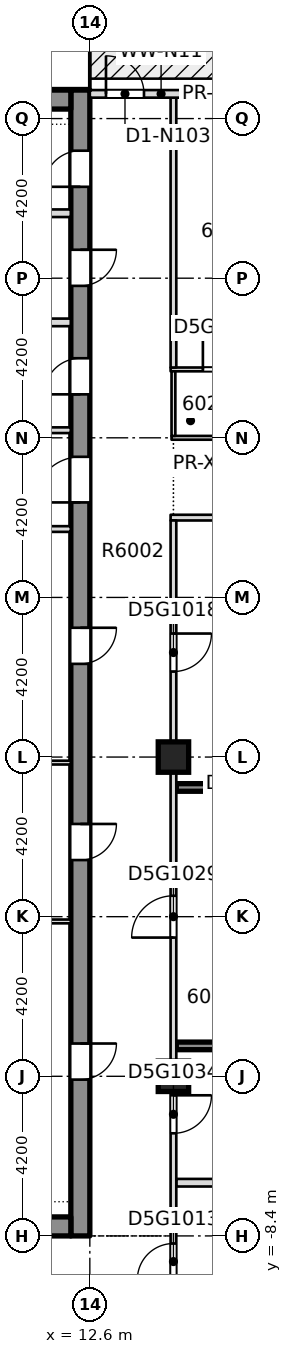
"""IFC4 building model, lengths in metres.
Left out: names, types, materials, properties, quantities, classifications, styles, units other than length and angle.
Written with IfcOpenShell. Run it as: python <this file> out.ifc"""

import sys

from ifc_helpers import new_model, si_unit, direction, frame, frame_2d, origin, origin_2d, place, context, subcontext, project, spatial, rectangle, extrude, element, fill, save


model = new_model("IFC4")
c1 = context("Model", 3, precision=1e-05, world=origin(), true_north=direction((0.0, 1.0)))
c2 = subcontext(c1, "Body", "Model", "MODEL_VIEW")
j1 = project(units=[si_unit("LENGTHUNIT", "METRE"), si_unit("PLANEANGLEUNIT", "RADIAN")], contexts=[c1])
p1 = place(None, origin())
s1 = spatial("IfcSite", under=j1, at=p1, CompositionType="ELEMENT")
p2 = place(p1, origin())
s2 = spatial("IfcBuilding", under=s1, at=p2, CompositionType="ELEMENT")
p3 = place(p2, frame((0.0, 0.0, 230.35)))
s3 = spatial("IfcBuildingStorey", under=s2, at=p3, CompositionType="ELEMENT", Elevation=230.35)
p4 = place(p3, frame((12.35, -8.4, -0.4), z_axis=(0.0, 0.0, 1.0), x_axis=(0.0, 1.0, 0.0)))
e1 = element("IfcWall", 1, at=p4, inside=s3, PredefinedType="SHEAR", context=c2, shape_type="SweptSolid", body=[
    extrude(rectangle(XDim=30.15, YDim=0.5, at=frame_2d((15.075, 0.0))), origin(), (0.0, 0.0, 1.0), 3.45),
])
p5 = place(p4, frame((4.113, 0.0, 0.4)))
e2 = element("IfcOpeningElement", 2, at=p5, cuts=e1, PredefinedType="OPENING", context=c2, shape_type="SweptSolid", body=[
    extrude(rectangle(XDim=0.95, YDim=2.1, at=frame_2d((0.475, 1.05))), frame((0.0, 0.26, 0.0), z_axis=(0.0, -1.0, 0.0), x_axis=(1.0, 0.0, 0.0)), (0.0, 0.0, 1.0), 0.52),
])
p6 = place(p4, frame((9.89, 0.0, 0.4)))
e3 = element("IfcOpeningElement", 3, at=p6, cuts=e1, PredefinedType="OPENING", context=c2, shape_type="SweptSolid", body=[
    extrude(rectangle(XDim=0.95, YDim=2.1, at=frame_2d((0.475, 1.05))), frame((0.0, 0.26, 0.0), z_axis=(0.0, -1.0, 0.0), x_axis=(1.0, 0.0, 0.0)), (0.0, 0.0, 1.0), 0.52),
])
p7 = place(p4, frame((15.052, 0.0, 0.4)))
e4 = element("IfcOpeningElement", 4, at=p7, cuts=e1, PredefinedType="OPENING", context=c2, shape_type="SweptSolid", body=[
    extrude(rectangle(XDim=0.95, YDim=2.1, at=frame_2d((0.475, 1.05))), frame((0.0, 0.26, 0.0), z_axis=(0.0, -1.0, 0.0), x_axis=(1.0, 0.0, 0.0)), (0.0, 0.0, 1.0), 0.52),
])
p8 = place(p4, frame((22.144, 0.0, 0.4)))
e5 = element("IfcOpeningElement", 5, at=p8, cuts=e1, PredefinedType="OPENING", context=c2, shape_type="SweptSolid", body=[
    extrude(rectangle(XDim=0.95, YDim=2.1, at=frame_2d((0.475, 1.05))), frame((0.0, 0.26, 0.0), z_axis=(0.0, -1.0, 0.0), x_axis=(1.0, 0.0, 0.0)), (0.0, 0.0, 1.0), 0.52),
])
p9 = place(p4, frame((24.998, 0.0, 0.4)))
e6 = element("IfcOpeningElement", 6, at=p9, cuts=e1, PredefinedType="OPENING", context=c2, shape_type="SweptSolid", body=[
    extrude(rectangle(XDim=0.95, YDim=2.1, at=frame_2d((0.475, 1.05))), frame((0.0, 0.26, 0.0), z_axis=(0.0, -1.0, 0.0), x_axis=(1.0, 0.0, 0.0)), (0.0, 0.0, 1.0), 0.52),
])
p10 = place(p4, frame((27.605, 0.0, 0.4)))
e7 = element("IfcOpeningElement", 7, at=p10, cuts=e1, PredefinedType="OPENING", context=c2, shape_type="SweptSolid", body=[
    extrude(rectangle(XDim=0.95, YDim=2.1, at=frame_2d((0.475, 1.05))), frame((0.0, 0.26, 0.0), z_axis=(0.0, -1.0, 0.0), x_axis=(1.0, 0.0, 0.0)), (0.0, 0.0, 1.0), 0.52),
])
p11 = place(p4, frame((19.3, 0.0, 0.4)))
e8 = element("IfcOpeningElement", 8, at=p11, cuts=e1, PredefinedType="OPENING", context=c2, shape_type="SweptSolid", body=[
    extrude(rectangle(XDim=1.2, YDim=2.1, at=frame_2d((0.6, 1.05))), frame((0.0, 0.26, 0.0), z_axis=(0.0, -1.0, 0.0), x_axis=(1.0, 0.0, 0.0)), (0.0, 0.0, 1.0), 0.52),
])
p12 = place(p3, frame((-12.1, -8.15, -0.4), z_axis=(0.0, 0.0, 1.0), x_axis=(1.0, 0.0, 0.0)))
e9 = element("IfcWall", 9, at=p12, inside=s3, PredefinedType="SHEAR", context=c2, shape_type="SweptSolid", body=[
    extrude(rectangle(XDim=24.2, YDim=0.5, at=frame_2d((12.1, 0.0))), origin(), (0.0, 0.0, 1.0), 3.45),
])
p13 = place(p12, frame((7.35, 0.0, 0.4)))
e10 = element("IfcOpeningElement", 10, at=p13, cuts=e9, PredefinedType="OPENING", context=c2, shape_type="SweptSolid", body=[
    extrude(rectangle(XDim=1.8, YDim=2.1, at=frame_2d((0.9, 1.05))), frame((0.0, 0.26, 0.0), z_axis=(0.0, -1.0, 0.0), x_axis=(1.0, 0.0, 0.0)), (0.0, 0.0, 1.0), 0.52),
])
p14 = place(p12, frame((15.05, 0.0, 0.4)))
e11 = element("IfcOpeningElement", 11, at=p14, cuts=e9, PredefinedType="OPENING", context=c2, shape_type="SweptSolid", body=[
    extrude(rectangle(XDim=1.8, YDim=2.1, at=frame_2d((0.9, 1.05))), frame((0.0, 0.26, 0.0), z_axis=(0.0, -1.0, 0.0), x_axis=(1.0, 0.0, 0.0)), (0.0, 0.0, 1.0), 0.52),
])
p15 = place(p3, frame((-12.1, 21.5, -0.4), z_axis=(0.0, 0.0, 1.0), x_axis=(1.0, 0.0, 0.0)))
e12 = element("IfcWall", 12, at=p15, inside=s3, PredefinedType="SHEAR", context=c2, shape_type="SweptSolid", body=[
    extrude(rectangle(XDim=24.2, YDim=0.5, at=frame_2d((12.1, 0.0))), origin(), (0.0, 0.0, 1.0), 3.45),
])
for number, where, z_axis, x_axis in (
    (13, (14.8, -4.2, -0.4), (0.0, 0.0, 1.0), (1.0, 0.0, 0.0)),
    (14, (14.8, 4.2, -0.4), (0.0, 0.0, 1.0), (1.0, 0.0, 0.0)),
):
    element("IfcColumn", number, at=place(p3, frame(where, z_axis=z_axis, x_axis=x_axis)), inside=s3, PredefinedType="COLUMN", context=c2, shape_type="SweptSolid", body=[
        extrude(rectangle(XDim=0.8, YDim=0.8, at=origin_2d()), origin(), (0.0, 0.0, 1.0), 3.45),
    ])
p16 = place(p3, frame((14.875, -7.0, 0.0), z_axis=(0.0, 0.0, 1.0), x_axis=(1.0, 0.0, 0.0)))
e15 = element("IfcWall", 15, at=p16, inside=s3, PredefinedType="PARTITIONING", context=c2, shape_type="SweptSolid", body=[
    extrude(rectangle(XDim=10.875, YDim=0.2, at=frame_2d((5.438, 0.0))), origin(), (0.0, 0.0, 1.0), 3.05),
])
p17 = place(p3, frame((14.875, -3.4, 0.0), z_axis=(0.0, 0.0, 1.0), x_axis=(1.0, 0.0, 0.0)))
e16 = element("IfcWall", 16, at=p17, inside=s3, PredefinedType="SOLIDWALL", context=c2, shape_type="SweptSolid", body=[
    extrude(rectangle(XDim=5.525, YDim=0.2, at=frame_2d((2.762, 0.0))), origin(), (0.0, 0.0, 1.0), 3.05),
])
p18 = place(p3, frame((14.875, 3.4, 0.0), z_axis=(0.0, 0.0, 1.0), x_axis=(1.0, 0.0, 0.0)))
e17 = element("IfcWall", 17, at=p18, inside=s3, PredefinedType="SOLIDWALL", context=c2, shape_type="SweptSolid", body=[
    extrude(rectangle(XDim=5.575, YDim=0.2, at=frame_2d((2.788, 0.0))), origin(), (0.0, 0.0, 1.0), 3.05),
])
p19 = place(p3, frame((14.725, 10.5, 0.0), z_axis=(0.0, 0.0, 1.0), x_axis=(1.0, 0.0, 0.0)))
e18 = element("IfcWall", 18, at=p19, inside=s3, PredefinedType="PARTITIONING", context=c2, shape_type="SweptSolid", body=[
    extrude(rectangle(XDim=11.025, YDim=0.15, at=frame_2d((5.512, 0.0))), origin(), (0.0, 0.0, 1.0), 3.05),
])
p20 = place(p3, frame((14.75, 12.6, 0.0), z_axis=(0.0, 0.0, 1.0), x_axis=(1.0, 0.0, 0.0)))
e19 = element("IfcWall", 19, at=p20, inside=s3, PredefinedType="PARTITIONING", context=c2, shape_type="SweptSolid", body=[
    extrude(rectangle(XDim=2.5, YDim=0.1, at=frame_2d((1.25, 0.0))), origin(), (0.0, 0.0, 1.0), 3.05),
])
p21 = place(p3, frame((14.725, 14.4, 0.0), z_axis=(0.0, 0.0, 1.0), x_axis=(1.0, 0.0, 0.0)))
e20 = element("IfcWall", 20, at=p21, inside=s3, PredefinedType="PARTITIONING", context=c2, shape_type="SweptSolid", body=[
    extrude(rectangle(XDim=2.525, YDim=0.1, at=frame_2d((1.262, 0.0))), origin(), (0.0, 0.0, 1.0), 3.05),
])
p22 = place(p21, frame((0.85, 0.0, 0.0)))
e21 = element("IfcOpeningElement", 21, at=p22, cuts=e20, PredefinedType="OPENING", context=c2, shape_type="SweptSolid", body=[
    extrude(rectangle(XDim=0.85, YDim=2.1, at=frame_2d((0.425, 1.05))), frame((0.0, 0.06, 0.0), z_axis=(0.0, -1.0, 0.0), x_axis=(1.0, 0.0, 0.0)), (0.0, 0.0, 1.0), 0.12),
])
p23 = place(p3, frame((14.8, -10.55, 0.0), z_axis=(0.0, 0.0, 1.0), x_axis=(0.0, 1.0, 0.0)))
e22 = element("IfcWall", 22, at=p23, inside=s3, PredefinedType="PARTITIONING", context=c2, shape_type="SweptSolid", body=[
    extrude(rectangle(XDim=20.975, YDim=0.15, at=frame_2d((10.488, 0.0))), origin(), (0.0, 0.0, 1.0), 3.05),
])
p24 = place(p23, frame((1.0, 0.0, 0.0)))
e23 = element("IfcOpeningElement", 23, at=p24, cuts=e22, PredefinedType="OPENING", context=c2, shape_type="SweptSolid", body=[
    extrude(rectangle(XDim=0.95, YDim=2.1, at=frame_2d((0.475, 1.05))), frame((0.0, 0.085, 0.0), z_axis=(0.0, -1.0, 0.0), x_axis=(1.0, 0.0, 0.0)), (0.0, 0.0, 1.0), 0.17),
])
p25 = place(p23, frame((17.0, 0.0, 0.0)))
e24 = element("IfcOpeningElement", 24, at=p25, cuts=e22, PredefinedType="OPENING", context=c2, shape_type="SweptSolid", body=[
    extrude(rectangle(XDim=1.0, YDim=2.1, at=frame_2d((0.5, 1.05))), frame((0.0, 0.085, 0.0), z_axis=(0.0, -1.0, 0.0), x_axis=(1.0, 0.0, 0.0)), (0.0, 0.0, 1.0), 0.17),
])
p26 = place(p23, frame((10.0, 0.0, 0.0)))
e25 = element("IfcOpeningElement", 25, at=p26, cuts=e22, PredefinedType="OPENING", context=c2, shape_type="SweptSolid", body=[
    extrude(rectangle(XDim=1.1, YDim=2.1, at=frame_2d((0.55, 1.05))), frame((0.0, 0.085, 0.0), z_axis=(0.0, -1.0, 0.0), x_axis=(1.0, 0.0, 0.0)), (0.0, 0.0, 1.0), 0.17),
])
p27 = place(p23, frame((4.85, 0.0, 0.0)))
e26 = element("IfcOpeningElement", 26, at=p27, cuts=e22, PredefinedType="OPENING", context=c2, shape_type="SweptSolid", body=[
    extrude(rectangle(XDim=1.0, YDim=2.1, at=frame_2d((0.5, 1.05))), frame((0.0, 0.085, 0.0), z_axis=(0.0, -1.0, 0.0), x_axis=(1.0, 0.0, 0.0)), (0.0, 0.0, 1.0), 0.17),
])
p28 = place(p3, frame((14.8, 12.65, 0.0), z_axis=(0.0, 0.0, 1.0), x_axis=(0.0, 1.0, 0.0)))
e27 = element("IfcWall", 27, at=p28, inside=s3, PredefinedType="PARTITIONING", context=c2, shape_type="SweptSolid", body=[
    extrude(rectangle(XDim=1.7, YDim=0.1, at=frame_2d((0.85, 0.0))), origin(), (0.0, 0.0, 1.0), 3.05),
])
p29 = place(p3, frame((14.8, 14.45, 0.0), z_axis=(0.0, 0.0, 1.0), x_axis=(0.0, 1.0, 0.0)))
e28 = element("IfcWall", 28, at=p29, inside=s3, PredefinedType="PARTITIONING", context=c2, shape_type="SweptSolid", body=[
    extrude(rectangle(XDim=7.1, YDim=0.15, at=frame_2d((3.55, 0.0))), origin(), (0.0, 0.0, 1.0), 3.05),
])
p30 = place(p3, frame((16.35, 21.65, 0.0), z_axis=(0.0, 0.0, 1.0), x_axis=(-1.0, 0.0, 0.0)))
e29 = element("IfcWall", 29, at=p30, inside=s3, PredefinedType="STANDARD", context=c2, shape_type="SweptSolid", body=[
    extrude(rectangle(XDim=3.75, YDim=0.2, at=frame_2d((1.875, 0.0))), origin(), (0.0, 0.0, 1.0), 3.05),
])
p31 = place(p30, frame((2.325, 0.0, 0.0)))
e30 = element("IfcOpeningElement", 30, at=p31, cuts=e29, PredefinedType="OPENING", context=c2, shape_type="SweptSolid", body=[
    extrude(rectangle(XDim=1.0, YDim=2.4, at=frame_2d((0.5, 1.2))), frame((0.0, 0.11, 0.0), z_axis=(0.0, -1.0, 0.0), x_axis=(1.0, 0.0, 0.0)), (0.0, 0.0, 1.0), 0.22),
])
for number, where, z_axis, x_axis in (
    (31, (8.651, -0.125, 0.0), (0.0, 0.0, 1.0), (1.0, 0.0, 0.0)),
    (32, (8.651, 4.054, 0.0), (0.0, 0.0, 1.0), (1.0, 0.0, 0.0)),
):
    element("IfcWall", number, at=place(p3, frame(where, z_axis=z_axis, x_axis=x_axis)), inside=s3, PredefinedType="PARTITIONING", context=c2, shape_type="SweptSolid", body=[
        extrude(rectangle(XDim=3.448, YDim=0.1, at=frame_2d((1.724, 0.0))), origin(), (0.0, 0.0, 1.0), 3.05),
    ])
for number, where, z_axis, x_axis in (
    (33, (8.651, 10.2, 0.0), (0.0, 0.0, 1.0), (1.0, 0.0, 0.0)),
    (34, (8.651, 12.8, 0.0), (0.0, 0.0, 1.0), (1.0, 0.0, 0.0)),
):
    element("IfcWall", number, at=place(p3, frame(where, z_axis=z_axis, x_axis=x_axis)), inside=s3, PredefinedType="PARTITIONING", context=c2, shape_type="SweptSolid", body=[
        extrude(rectangle(XDim=3.448, YDim=0.15, at=frame_2d((1.724, 0.0))), origin(), (0.0, 0.0, 1.0), 3.05),
    ])
for number, where, z_axis, x_axis in (
    (35, (8.651, 15.637, 0.0), (0.0, 0.0, 1.0), (1.0, 0.0, 0.0)),
    (36, (8.651, 18.509, 0.0), (0.0, 0.0, 1.0), (1.0, 0.0, 0.0)),
):
    element("IfcWall", number, at=place(p3, frame(where, z_axis=z_axis, x_axis=x_axis)), inside=s3, PredefinedType="PARTITIONING", context=c2, shape_type="SweptSolid", body=[
        extrude(rectangle(XDim=3.448, YDim=0.2, at=frame_2d((1.724, 0.0))), origin(), (0.0, 0.0, 1.0), 3.05),
    ])
p32 = place(p24, origin())
e37 = element("IfcDoor", 37, at=p32, inside=s3, OperationType="SINGLE_SWING_RIGHT", PredefinedType="DOOR", context=c2, shape_type="SweptSolid", body=[
    extrude(rectangle(XDim=0.95, YDim=2.1, at=frame_2d((0.475, 1.05))), frame((0.0, 0.025, 0.0), z_axis=(0.0, -1.0, 0.0), x_axis=(1.0, 0.0, 0.0)), (0.0, 0.0, 1.0), 0.05),
])
fill(e23, e37)
p33 = place(p25, origin())
e38 = element("IfcDoor", 38, at=p33, inside=s3, OperationType="SINGLE_SWING_RIGHT", PredefinedType="DOOR", context=c2, shape_type="SweptSolid", body=[
    extrude(rectangle(XDim=1.0, YDim=2.1, at=frame_2d((0.5, 1.05))), frame((0.0, 0.025, 0.0), z_axis=(0.0, -1.0, 0.0), x_axis=(1.0, 0.0, 0.0)), (0.0, 0.0, 1.0), 0.05),
])
fill(e24, e38)
p34 = place(p22, origin())
e39 = element("IfcDoor", 39, at=p34, inside=s3, OperationType="SINGLE_SWING_RIGHT", PredefinedType="DOOR", context=c2, shape_type="SweptSolid", body=[
    extrude(rectangle(XDim=0.85, YDim=2.1, at=frame_2d((0.425, 1.05))), frame((0.0, 0.025, 0.0), z_axis=(0.0, -1.0, 0.0), x_axis=(1.0, 0.0, 0.0)), (0.0, 0.0, 1.0), 0.05),
])
fill(e21, e39)
p35 = place(p26, origin())
e40 = element("IfcDoor", 40, at=p35, inside=s3, OperationType="SINGLE_SWING_LEFT", PredefinedType="DOOR", context=c2, shape_type="SweptSolid", body=[
    extrude(rectangle(XDim=1.1, YDim=2.1, at=frame_2d((0.55, 1.05))), frame((0.0, 0.025, 0.0), z_axis=(0.0, -1.0, 0.0), x_axis=(1.0, 0.0, 0.0)), (0.0, 0.0, 1.0), 0.05),
])
fill(e25, e40)
p36 = place(p27, origin())
e41 = element("IfcDoor", 41, at=p36, inside=s3, OperationType="SINGLE_SWING_LEFT", PredefinedType="DOOR", context=c2, shape_type="SweptSolid", body=[
    extrude(rectangle(XDim=1.0, YDim=2.1, at=frame_2d((0.5, 1.05))), frame((0.0, 0.025, 0.0), z_axis=(0.0, -1.0, 0.0), x_axis=(1.0, 0.0, 0.0)), (0.0, 0.0, 1.0), 0.05),
])
fill(e26, e41)
p37 = place(p31, origin())
e42 = element("IfcDoor", 42, at=p37, inside=s3, OperationType="SINGLE_SWING_LEFT", PredefinedType="DOOR", context=c2, shape_type="SweptSolid", body=[
    extrude(rectangle(XDim=1.0, YDim=2.4, at=frame_2d((0.5, 1.2))), frame((0.0, 0.025, 0.0), z_axis=(0.0, -1.0, 0.0), x_axis=(1.0, 0.0, 0.0)), (0.0, 0.0, 1.0), 0.05),
])
fill(e30, e42)
p38 = place(p5, origin())
e43 = element("IfcDoor", 43, at=p38, inside=s3, OperationType="SINGLE_SWING_LEFT", PredefinedType="DOOR", context=c2, shape_type="SweptSolid", body=[
    extrude(rectangle(XDim=0.95, YDim=2.1, at=frame_2d((0.475, 1.05))), frame((0.0, 0.025, 0.0), z_axis=(0.0, -1.0, 0.0), x_axis=(1.0, 0.0, 0.0)), (0.0, 0.0, 1.0), 0.05),
])
fill(e2, e43)
p39 = place(p6, origin())
e44 = element("IfcDoor", 44, at=p39, inside=s3, OperationType="SINGLE_SWING_LEFT", PredefinedType="DOOR", context=c2, shape_type="SweptSolid", body=[
    extrude(rectangle(XDim=0.95, YDim=2.1, at=frame_2d((0.475, 1.05))), frame((0.0, 0.025, 0.0), z_axis=(0.0, -1.0, 0.0), x_axis=(1.0, 0.0, 0.0)), (0.0, 0.0, 1.0), 0.05),
])
fill(e3, e44)
p40 = place(p7, origin())
e45 = element("IfcDoor", 45, at=p40, inside=s3, OperationType="SINGLE_SWING_LEFT", PredefinedType="DOOR", context=c2, shape_type="SweptSolid", body=[
    extrude(rectangle(XDim=0.95, YDim=2.1, at=frame_2d((0.475, 1.05))), frame((0.0, 0.025, 0.0), z_axis=(0.0, -1.0, 0.0), x_axis=(1.0, 0.0, 0.0)), (0.0, 0.0, 1.0), 0.05),
])
fill(e4, e45)
p41 = place(p8, origin())
e46 = element("IfcDoor", 46, at=p41, inside=s3, OperationType="SINGLE_SWING_LEFT", PredefinedType="DOOR", context=c2, shape_type="SweptSolid", body=[
    extrude(rectangle(XDim=0.95, YDim=2.1, at=frame_2d((0.475, 1.05))), frame((0.0, 0.025, 0.0), z_axis=(0.0, -1.0, 0.0), x_axis=(1.0, 0.0, 0.0)), (0.0, 0.0, 1.0), 0.05),
])
fill(e5, e46)
p42 = place(p9, origin())
e47 = element("IfcDoor", 47, at=p42, inside=s3, OperationType="SINGLE_SWING_LEFT", PredefinedType="DOOR", context=c2, shape_type="SweptSolid", body=[
    extrude(rectangle(XDim=0.95, YDim=2.1, at=frame_2d((0.475, 1.05))), frame((0.0, 0.025, 0.0), z_axis=(0.0, -1.0, 0.0), x_axis=(1.0, 0.0, 0.0)), (0.0, 0.0, 1.0), 0.05),
])
fill(e6, e47)
p43 = place(p10, origin())
e48 = element("IfcDoor", 48, at=p43, inside=s3, OperationType="SINGLE_SWING_LEFT", PredefinedType="DOOR", context=c2, shape_type="SweptSolid", body=[
    extrude(rectangle(XDim=0.95, YDim=2.1, at=frame_2d((0.475, 1.05))), frame((0.0, 0.025, 0.0), z_axis=(0.0, -1.0, 0.0), x_axis=(1.0, 0.0, 0.0)), (0.0, 0.0, 1.0), 0.05),
])
fill(e7, e48)
p44 = place(p11, origin())
e49 = element("IfcDoor", 49, at=p44, inside=s3, OperationType="SINGLE_SWING_LEFT", PredefinedType="DOOR", context=c2, shape_type="SweptSolid", body=[
    extrude(rectangle(XDim=1.2, YDim=2.1, at=frame_2d((0.6, 1.05))), frame((0.0, 0.025, 0.0), z_axis=(0.0, -1.0, 0.0), x_axis=(1.0, 0.0, 0.0)), (0.0, 0.0, 1.0), 0.05),
])
fill(e8, e49)
save(model, sys.argv[1])
